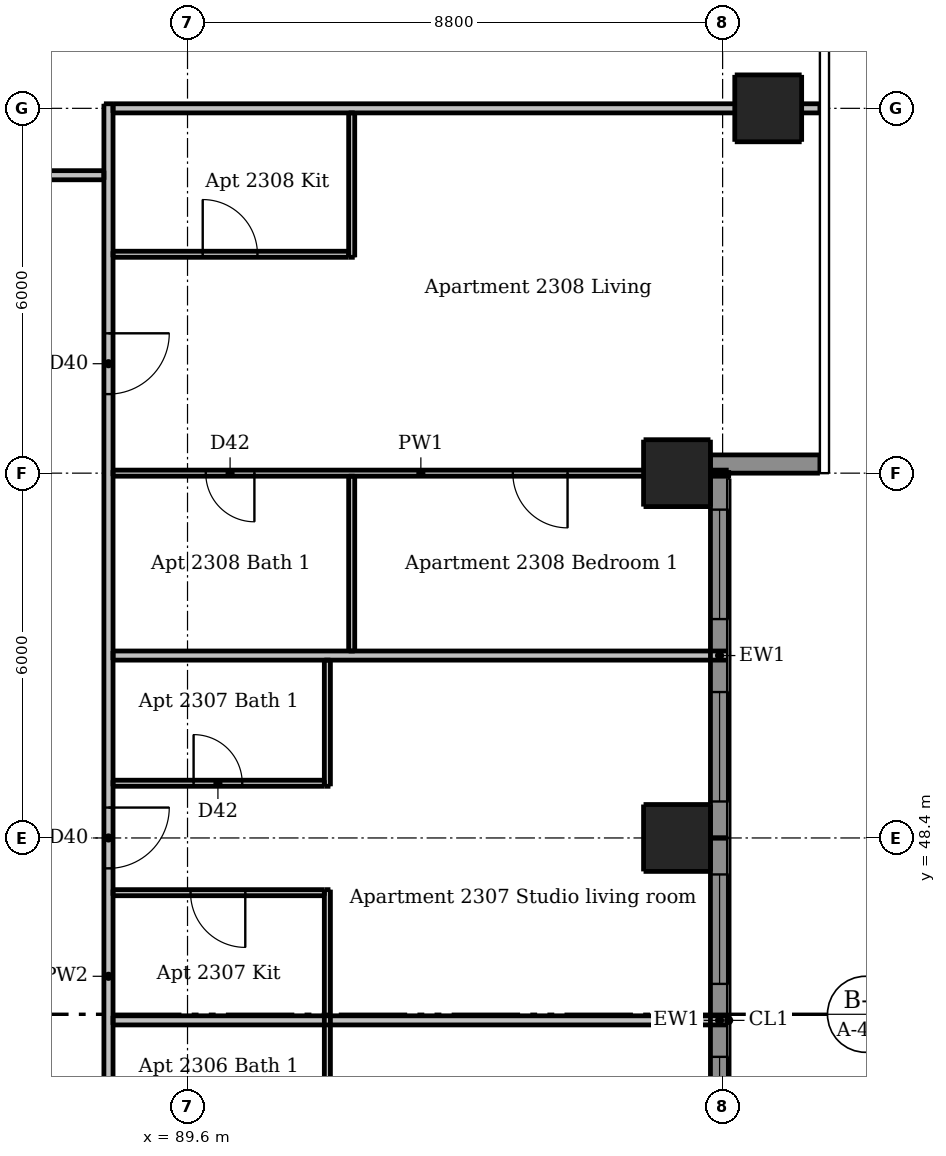
"""IFC4 building model, lengths in metres.
Left out: names, types, materials, properties, quantities, classifications, styles, units other than length and angle.
Written with IfcOpenShell. Run it as: python <this file> out.ifc"""

import sys

from ifc_helpers import new_model, si_unit, direction, frame, frame_2d, origin, origin_2d, place, context, subcontext, project, spatial, rectangle, extrude, element, fill, save


model = new_model("IFC4")
c1 = context("Model", 3, precision=1e-05, world=origin(), true_north=direction((0.0, 1.0)))
c2 = subcontext(c1, "Body", "Model", "MODEL_VIEW")
j1 = project(units=[si_unit("LENGTHUNIT", "METRE"), si_unit("PLANEANGLEUNIT", "RADIAN")], contexts=[c1])
p1 = place(None, origin())
s1 = spatial("IfcSite", under=j1, at=p1, CompositionType="ELEMENT")
p2 = place(p1, origin())
s2 = spatial("IfcBuilding", under=s1, at=p2, CompositionType="ELEMENT")
p3 = place(p2, frame((0.0, 0.0, 88.6)))
s3 = spatial("IfcBuildingStorey", under=s2, at=p3, CompositionType="ELEMENT", Elevation=88.6)
for number, where, z_axis, x_axis in (
    (1, (97.65, 48.4, 0.0), (0.0, 0.0, 1.0), (1.0, 0.0, 0.0)),
    (2, (97.65, 54.4, 0.0), (0.0, 0.0, 1.0), (1.0, 0.0, 0.0)),
    (3, (99.15, 60.4, 0.0), (0.0, 0.0, 1.0), (1.0, 0.0, 0.0)),
):
    element("IfcColumn", number, at=place(p3, frame(where, z_axis=z_axis, x_axis=x_axis)), inside=s3, PredefinedType="COLUMN", context=c2, shape_type="SweptSolid", body=[
        extrude(rectangle(XDim=1.1, YDim=1.1, at=origin_2d()), origin(), (0.0, 0.0, 1.0), 3.05),
    ])
p4 = place(p3, frame((98.2, 54.55, 0.0), z_axis=(0.0, 0.0, 1.0), x_axis=(1.0, 0.0, 0.0)))
e4 = element("IfcWall", 4, at=p4, inside=s3, PredefinedType="SOLIDWALL", context=c2, shape_type="SweptSolid", body=[
    extrude(rectangle(XDim=1.8, YDim=0.3, at=frame_2d((0.9, 0.0))), origin(), (0.0, 0.0, 1.0), 3.05),
])
p5 = place(p3, frame((98.35, 42.4, 0.0), z_axis=(0.0, 0.0, 1.0), x_axis=(0.0, 1.0, 0.0)))
e5 = element("IfcWall", 5, at=p5, inside=s3, PredefinedType="SOLIDWALL", context=c2, shape_type="SweptSolid", body=[
    extrude(rectangle(XDim=6.0, YDim=0.3, at=frame_2d((3.0, 0.0))), origin(), (0.0, 0.0, 1.0), 3.05),
])
p6 = place(p5, frame((0.6, 0.0, 0.15)))
e6 = element("IfcOpeningElement", 6, at=p6, cuts=e5, PredefinedType="OPENING", context=c2, shape_type="SweptSolid", body=[
    extrude(rectangle(XDim=1.8, YDim=2.1, at=frame_2d((0.9, 1.05))), frame((0.0, 0.16, 0.0), z_axis=(0.0, -1.0, 0.0), x_axis=(1.0, 0.0, 0.0)), (0.0, 0.0, 1.0), 0.32),
])
p7 = place(p5, frame((3.6, 0.0, 0.15)))
e7 = element("IfcOpeningElement", 7, at=p7, cuts=e5, PredefinedType="OPENING", context=c2, shape_type="SweptSolid", body=[
    extrude(rectangle(XDim=1.8, YDim=2.1, at=frame_2d((0.9, 1.05))), frame((0.0, 0.16, 0.0), z_axis=(0.0, -1.0, 0.0), x_axis=(1.0, 0.0, 0.0)), (0.0, 0.0, 1.0), 0.32),
])
p8 = place(p3, frame((98.35, 48.4, 0.0), z_axis=(0.0, 0.0, 1.0), x_axis=(0.0, 1.0, 0.0)))
e8 = element("IfcWall", 8, at=p8, inside=s3, PredefinedType="SOLIDWALL", context=c2, shape_type="SweptSolid", body=[
    extrude(rectangle(XDim=6.0, YDim=0.3, at=frame_2d((3.0, 0.0))), origin(), (0.0, 0.0, 1.0), 3.05),
])
p9 = place(p8, frame((0.6, 0.0, 0.15)))
e9 = element("IfcOpeningElement", 9, at=p9, cuts=e8, PredefinedType="OPENING", context=c2, shape_type="SweptSolid", body=[
    extrude(rectangle(XDim=1.8, YDim=2.1, at=frame_2d((0.9, 1.05))), frame((0.0, 0.16, 0.0), z_axis=(0.0, -1.0, 0.0), x_axis=(1.0, 0.0, 0.0)), (0.0, 0.0, 1.0), 0.32),
])
p10 = place(p8, frame((3.6, 0.0, 0.15)))
e10 = element("IfcOpeningElement", 10, at=p10, cuts=e8, PredefinedType="OPENING", context=c2, shape_type="SweptSolid", body=[
    extrude(rectangle(XDim=1.8, YDim=2.1, at=frame_2d((0.9, 1.05))), frame((0.0, 0.16, 0.0), z_axis=(0.0, -1.0, 0.0), x_axis=(1.0, 0.0, 0.0)), (0.0, 0.0, 1.0), 0.32),
])
p11 = place(p3, frame((91.9, 43.25, 0.0), z_axis=(0.0, 0.0, 1.0), x_axis=(0.0, 1.0, 0.0)))
e11 = element("IfcWall", 11, at=p11, inside=s3, PredefinedType="PARTITIONING", context=c2, shape_type="SweptSolid", body=[
    extrude(rectangle(XDim=4.3, YDim=0.1, at=frame_2d((2.15, 0.0))), origin(), (0.0, 0.0, 1.0), 3.05),
])
p12 = place(p3, frame((91.9, 49.25, 0.0), z_axis=(0.0, 0.0, 1.0), x_axis=(0.0, 1.0, 0.0)))
e12 = element("IfcWall", 12, at=p12, inside=s3, PredefinedType="PARTITIONING", context=c2, shape_type="SweptSolid", body=[
    extrude(rectangle(XDim=2.075, YDim=0.1, at=frame_2d((1.038, 0.0))), origin(), (0.0, 0.0, 1.0), 3.05),
])
p13 = place(p3, frame((92.3, 51.475, 0.0), z_axis=(0.0, 0.0, 1.0), x_axis=(0.0, 1.0, 0.0)))
e13 = element("IfcWall", 13, at=p13, inside=s3, PredefinedType="PARTITIONING", context=c2, shape_type="SweptSolid", body=[
    extrude(rectangle(XDim=2.875, YDim=0.1, at=frame_2d((1.438, 0.0))), origin(), (0.0, 0.0, 1.0), 3.05),
])
p14 = place(p3, frame((92.3, 57.95, 0.0), z_axis=(0.0, 0.0, 1.0), x_axis=(0.0, 1.0, 0.0)))
e14 = element("IfcWall", 14, at=p14, inside=s3, PredefinedType="PARTITIONING", context=c2, shape_type="SweptSolid", body=[
    extrude(rectangle(XDim=2.375, YDim=0.1, at=frame_2d((1.188, 0.0))), origin(), (0.0, 0.0, 1.0), 3.05),
])
p15 = place(p3, frame((88.375, 58.0, 0.0), z_axis=(0.0, 0.0, 1.0), x_axis=(1.0, 0.0, 0.0)))
e15 = element("IfcWall", 15, at=p15, inside=s3, PredefinedType="PARTITIONING", context=c2, shape_type="SweptSolid", body=[
    extrude(rectangle(XDim=3.875, YDim=0.1, at=frame_2d((1.938, 0.0))), origin(), (0.0, 0.0, 1.0), 3.05),
])
p16 = place(p15, frame((1.475, 0.0, 0.0)))
e16 = element("IfcOpeningElement", 16, at=p16, cuts=e15, PredefinedType="OPENING", context=c2, shape_type="SweptSolid", body=[
    extrude(rectangle(XDim=0.9, YDim=2.1, at=frame_2d((0.45, 1.05))), frame((0.0, 0.06, 0.0), z_axis=(0.0, -1.0, 0.0), x_axis=(1.0, 0.0, 0.0)), (0.0, 0.0, 1.0), 0.12),
])
p17 = place(p3, frame((98.5, 54.4, 0.0), z_axis=(0.0, 0.0, 1.0), x_axis=(-1.0, 0.0, 0.0)))
e17 = element("IfcWall", 17, at=p17, inside=s3, PredefinedType="PARTITIONING", context=c2, shape_type="SweptSolid", body=[
    extrude(rectangle(XDim=10.125, YDim=0.1, at=frame_2d((5.062, 0.0))), origin(), (0.0, 0.0, 1.0), 2.516),
])
p18 = place(p17, frame((2.65, 0.0, 0.0)))
e18 = element("IfcOpeningElement", 18, at=p18, cuts=e17, PredefinedType="OPENING", context=c2, shape_type="SweptSolid", body=[
    extrude(rectangle(XDim=0.9, YDim=2.1, at=frame_2d((0.45, 1.05))), frame((0.0, 0.06, 0.0), z_axis=(0.0, -1.0, 0.0), x_axis=(1.0, 0.0, 0.0)), (0.0, 0.0, 1.0), 0.12),
])
p19 = place(p17, frame((7.8, 0.0, 0.0)))
e19 = element("IfcOpeningElement", 19, at=p19, cuts=e17, PredefinedType="OPENING", context=c2, shape_type="SweptSolid", body=[
    extrude(rectangle(XDim=0.8, YDim=2.1, at=frame_2d((0.4, 1.05))), frame((0.0, 0.06, 0.0), z_axis=(0.0, -1.0, 0.0), x_axis=(1.0, 0.0, 0.0)), (0.0, 0.0, 1.0), 0.12),
])
p20 = place(p3, frame((88.375, 49.3, 0.0), z_axis=(0.0, 0.0, 1.0), x_axis=(1.0, 0.0, 0.0)))
e20 = element("IfcWall", 20, at=p20, inside=s3, PredefinedType="PARTITIONING", context=c2, shape_type="SweptSolid", body=[
    extrude(rectangle(XDim=3.475, YDim=0.1, at=frame_2d((1.738, 0.0))), origin(), (0.0, 0.0, 1.0), 3.05),
])
p21 = place(p20, frame((1.325, 0.0, 0.0)))
e21 = element("IfcOpeningElement", 21, at=p21, cuts=e20, PredefinedType="OPENING", context=c2, shape_type="SweptSolid", body=[
    extrude(rectangle(XDim=0.8, YDim=2.1, at=frame_2d((0.4, 1.05))), frame((0.0, 0.06, 0.0), z_axis=(0.0, -1.0, 0.0), x_axis=(1.0, 0.0, 0.0)), (0.0, 0.0, 1.0), 0.12),
])
p22 = place(p3, frame((91.85, 47.5, 0.0), z_axis=(0.0, 0.0, 1.0), x_axis=(-1.0, 0.0, 0.0)))
e22 = element("IfcWall", 22, at=p22, inside=s3, PredefinedType="PARTITIONING", context=c2, shape_type="SweptSolid", body=[
    extrude(rectangle(XDim=3.475, YDim=0.1, at=frame_2d((1.738, 0.0))), origin(), (0.0, 0.0, 1.0), 3.05),
])
p23 = place(p22, frame((1.3, 0.0, 0.0)))
e23 = element("IfcOpeningElement", 23, at=p23, cuts=e22, PredefinedType="OPENING", context=c2, shape_type="SweptSolid", body=[
    extrude(rectangle(XDim=0.9, YDim=2.1, at=frame_2d((0.45, 1.05))), frame((0.0, 0.06, 0.0), z_axis=(0.0, -1.0, 0.0), x_axis=(1.0, 0.0, 0.0)), (0.0, 0.0, 1.0), 0.12),
])
p24 = place(p3, frame((88.3, 60.475, 0.0), z_axis=(0.0, 0.0, 1.0), x_axis=(0.0, -1.0, 0.0)))
e24 = element("IfcWall", 24, at=p24, inside=s3, PredefinedType="PARTITIONING", context=c2, shape_type="SweptSolid", body=[
    extrude(rectangle(XDim=28.7, YDim=0.15, at=frame_2d((14.35, 0.0))), origin(), (0.0, 0.0, 1.0), 3.05),
])
p25 = place(p24, frame((27.425, 0.0, 0.0)))
e25 = element("IfcOpeningElement", 25, at=p25, cuts=e24, PredefinedType="OPENING", context=c2, shape_type="SweptSolid", body=[
    extrude(rectangle(XDim=1.0, YDim=2.1, at=frame_2d((0.5, 1.05))), frame((0.0, 0.085, 0.0), z_axis=(0.0, -1.0, 0.0), x_axis=(1.0, 0.0, 0.0)), (0.0, 0.0, 1.0), 0.17),
])
p26 = place(p24, frame((17.575, 0.0, 0.0)))
e26 = element("IfcOpeningElement", 26, at=p26, cuts=e24, PredefinedType="OPENING", context=c2, shape_type="SweptSolid", body=[
    extrude(rectangle(XDim=1.0, YDim=2.1, at=frame_2d((0.5, 1.05))), frame((0.0, 0.085, 0.0), z_axis=(0.0, -1.0, 0.0), x_axis=(1.0, 0.0, 0.0)), (0.0, 0.0, 1.0), 0.17),
])
p27 = place(p24, frame((11.575, 0.0, 0.0)))
e27 = element("IfcOpeningElement", 27, at=p27, cuts=e24, PredefinedType="OPENING", context=c2, shape_type="SweptSolid", body=[
    extrude(rectangle(XDim=1.0, YDim=2.1, at=frame_2d((0.5, 1.05))), frame((0.0, 0.085, 0.0), z_axis=(0.0, -1.0, 0.0), x_axis=(1.0, 0.0, 0.0)), (0.0, 0.0, 1.0), 0.17),
])
p28 = place(p24, frame((3.775, 0.0, 0.0)))
e28 = element("IfcOpeningElement", 28, at=p28, cuts=e24, PredefinedType="OPENING", context=c2, shape_type="SweptSolid", body=[
    extrude(rectangle(XDim=1.0, YDim=2.1, at=frame_2d((0.5, 1.05))), frame((0.0, 0.085, 0.0), z_axis=(0.0, -1.0, 0.0), x_axis=(1.0, 0.0, 0.0)), (0.0, 0.0, 1.0), 0.17),
])
p29 = place(p3, frame((88.375, 60.4, 0.0), z_axis=(0.0, 0.0, 1.0), x_axis=(1.0, 0.0, 0.0)))
e29 = element("IfcWall", 29, at=p29, inside=s3, PredefinedType="PARTITIONING", context=c2, shape_type="SweptSolid", body=[
    extrude(rectangle(XDim=11.625, YDim=0.15, at=frame_2d((5.812, 0.0))), origin(), (0.0, 0.0, 1.0), 2.516),
])
p30 = place(p3, frame((59.675, 59.3, 0.0), z_axis=(0.0, 0.0, 1.0), x_axis=(1.0, 0.0, 0.0)))
e30 = element("IfcWall", 30, at=p30, inside=s3, PredefinedType="PARTITIONING", context=c2, shape_type="SweptSolid", body=[
    extrude(rectangle(XDim=28.55, YDim=0.15, at=frame_2d((14.275, 0.0))), origin(), (0.0, 0.0, 1.0), 3.05),
])
p31 = place(p30, frame((2.425, 0.0, 0.0)))
e31 = element("IfcOpeningElement", 31, at=p31, cuts=e30, PredefinedType="OPENING", context=c2, shape_type="SweptSolid", body=[
    extrude(rectangle(XDim=1.0, YDim=2.1, at=frame_2d((0.5, 1.05))), frame((0.0, 0.085, 0.0), z_axis=(0.0, -1.0, 0.0), x_axis=(1.0, 0.0, 0.0)), (0.0, 0.0, 1.0), 0.17),
])
p32 = place(p30, frame((8.425, 0.0, 0.0)))
e32 = element("IfcOpeningElement", 32, at=p32, cuts=e30, PredefinedType="OPENING", context=c2, shape_type="SweptSolid", body=[
    extrude(rectangle(XDim=1.0, YDim=2.1, at=frame_2d((0.5, 1.05))), frame((0.0, 0.085, 0.0), z_axis=(0.0, -1.0, 0.0), x_axis=(1.0, 0.0, 0.0)), (0.0, 0.0, 1.0), 0.17),
])
p33 = place(p30, frame((14.425, 0.0, 0.0)))
e33 = element("IfcOpeningElement", 33, at=p33, cuts=e30, PredefinedType="OPENING", context=c2, shape_type="SweptSolid", body=[
    extrude(rectangle(XDim=1.0, YDim=2.1, at=frame_2d((0.5, 1.05))), frame((0.0, 0.085, 0.0), z_axis=(0.0, -1.0, 0.0), x_axis=(1.0, 0.0, 0.0)), (0.0, 0.0, 1.0), 0.17),
])
p34 = place(p30, frame((25.775, 0.0, 0.0)))
e34 = element("IfcOpeningElement", 34, at=p34, cuts=e30, PredefinedType="OPENING", context=c2, shape_type="SweptSolid", body=[
    extrude(rectangle(XDim=1.0, YDim=2.1, at=frame_2d((0.5, 1.05))), frame((0.0, 0.085, 0.0), z_axis=(0.0, -1.0, 0.0), x_axis=(1.0, 0.0, 0.0)), (0.0, 0.0, 1.0), 0.17),
])
for number, where, z_axis, x_axis in (
    (35, (88.375, 51.4, 0.0), (0.0, 0.0, 1.0), (1.0, 0.0, 0.0)),
    (36, (88.375, 45.4, 0.0), (0.0, 0.0, 1.0), (1.0, 0.0, 0.0)),
):
    element("IfcWall", number, at=place(p3, frame(where, z_axis=z_axis, x_axis=x_axis)), inside=s3, PredefinedType="PARTITIONING", context=c2, shape_type="SweptSolid", body=[
        extrude(rectangle(XDim=10.125, YDim=0.15, at=frame_2d((5.062, 0.0))), origin(), (0.0, 0.0, 1.0), 3.05),
    ])
p35 = place(p6, origin())
e37 = element("IfcWindow", 37, at=p35, inside=s3, PartitioningType="DOUBLE_PANEL_VERTICAL", PredefinedType="WINDOW", context=c2, shape_type="SweptSolid", body=[
    extrude(rectangle(XDim=1.8, YDim=2.1, at=frame_2d((0.9, 1.05))), frame((0.0, 0.03, 0.0), z_axis=(0.0, -1.0, 0.0), x_axis=(1.0, 0.0, 0.0)), (0.0, 0.0, 1.0), 0.06),
])
fill(e6, e37)
p36 = place(p7, origin())
e38 = element("IfcWindow", 38, at=p36, inside=s3, PartitioningType="DOUBLE_PANEL_VERTICAL", PredefinedType="WINDOW", context=c2, shape_type="SweptSolid", body=[
    extrude(rectangle(XDim=1.8, YDim=2.1, at=frame_2d((0.9, 1.05))), frame((0.0, 0.03, 0.0), z_axis=(0.0, -1.0, 0.0), x_axis=(1.0, 0.0, 0.0)), (0.0, 0.0, 1.0), 0.06),
])
fill(e7, e38)
p37 = place(p9, origin())
e39 = element("IfcWindow", 39, at=p37, inside=s3, PartitioningType="DOUBLE_PANEL_VERTICAL", PredefinedType="WINDOW", context=c2, shape_type="SweptSolid", body=[
    extrude(rectangle(XDim=1.8, YDim=2.1, at=frame_2d((0.9, 1.05))), frame((0.0, 0.03, 0.0), z_axis=(0.0, -1.0, 0.0), x_axis=(1.0, 0.0, 0.0)), (0.0, 0.0, 1.0), 0.06),
])
fill(e9, e39)
p38 = place(p10, origin())
e40 = element("IfcWindow", 40, at=p38, inside=s3, PartitioningType="DOUBLE_PANEL_VERTICAL", PredefinedType="WINDOW", context=c2, shape_type="SweptSolid", body=[
    extrude(rectangle(XDim=1.8, YDim=2.1, at=frame_2d((0.9, 1.05))), frame((0.0, 0.03, 0.0), z_axis=(0.0, -1.0, 0.0), x_axis=(1.0, 0.0, 0.0)), (0.0, 0.0, 1.0), 0.06),
])
fill(e10, e40)
p39 = place(p27, origin())
e41 = element("IfcDoor", 41, at=p39, inside=s3, OperationType="SINGLE_SWING_LEFT", PredefinedType="DOOR", context=c2, shape_type="SweptSolid", body=[
    extrude(rectangle(XDim=1.0, YDim=2.1, at=frame_2d((0.5, 1.05))), frame((0.0, 0.025, 0.0), z_axis=(0.0, -1.0, 0.0), x_axis=(1.0, 0.0, 0.0)), (0.0, 0.0, 1.0), 0.05),
])
fill(e27, e41)
p40 = place(p23, origin())
e42 = element("IfcDoor", 42, at=p40, inside=s3, OperationType="SINGLE_SWING_LEFT", PredefinedType="DOOR", context=c2, shape_type="SweptSolid", body=[
    extrude(rectangle(XDim=0.9, YDim=2.1, at=frame_2d((0.45, 1.05))), frame((0.0, 0.025, 0.0), z_axis=(0.0, -1.0, 0.0), x_axis=(1.0, 0.0, 0.0)), (0.0, 0.0, 1.0), 0.05),
])
fill(e23, e42)
p41 = place(p21, origin())
e43 = element("IfcDoor", 43, at=p41, inside=s3, OperationType="SINGLE_SWING_LEFT", PredefinedType="DOOR", context=c2, shape_type="SweptSolid", body=[
    extrude(rectangle(XDim=0.8, YDim=2.1, at=frame_2d((0.4, 1.05))), frame((0.0, 0.025, 0.0), z_axis=(0.0, -1.0, 0.0), x_axis=(1.0, 0.0, 0.0)), (0.0, 0.0, 1.0), 0.05),
])
fill(e21, e43)
p42 = place(p28, origin())
e44 = element("IfcDoor", 44, at=p42, inside=s3, OperationType="SINGLE_SWING_LEFT", PredefinedType="DOOR", context=c2, shape_type="SweptSolid", body=[
    extrude(rectangle(XDim=1.0, YDim=2.1, at=frame_2d((0.5, 1.05))), frame((0.0, 0.025, 0.0), z_axis=(0.0, -1.0, 0.0), x_axis=(1.0, 0.0, 0.0)), (0.0, 0.0, 1.0), 0.05),
])
fill(e28, e44)
p43 = place(p16, origin())
e45 = element("IfcDoor", 45, at=p43, inside=s3, OperationType="SINGLE_SWING_LEFT", PredefinedType="DOOR", context=c2, shape_type="SweptSolid", body=[
    extrude(rectangle(XDim=0.9, YDim=2.1, at=frame_2d((0.45, 1.05))), frame((0.0, 0.025, 0.0), z_axis=(0.0, -1.0, 0.0), x_axis=(1.0, 0.0, 0.0)), (0.0, 0.0, 1.0), 0.05),
])
fill(e16, e45)
p44 = place(p18, origin())
e46 = element("IfcDoor", 46, at=p44, inside=s3, OperationType="SINGLE_SWING_LEFT", PredefinedType="DOOR", context=c2, shape_type="SweptSolid", body=[
    extrude(rectangle(XDim=0.9, YDim=2.1, at=frame_2d((0.45, 1.05))), frame((0.0, 0.025, 0.0), z_axis=(0.0, -1.0, 0.0), x_axis=(1.0, 0.0, 0.0)), (0.0, 0.0, 1.0), 0.05),
])
fill(e18, e46)
p45 = place(p19, origin())
e47 = element("IfcDoor", 47, at=p45, inside=s3, OperationType="SINGLE_SWING_LEFT", PredefinedType="DOOR", context=c2, shape_type="SweptSolid", body=[
    extrude(rectangle(XDim=0.8, YDim=2.1, at=frame_2d((0.4, 1.05))), frame((0.0, 0.025, 0.0), z_axis=(0.0, -1.0, 0.0), x_axis=(1.0, 0.0, 0.0)), (0.0, 0.0, 1.0), 0.05),
])
fill(e19, e47)
save(model, sys.argv[1])
